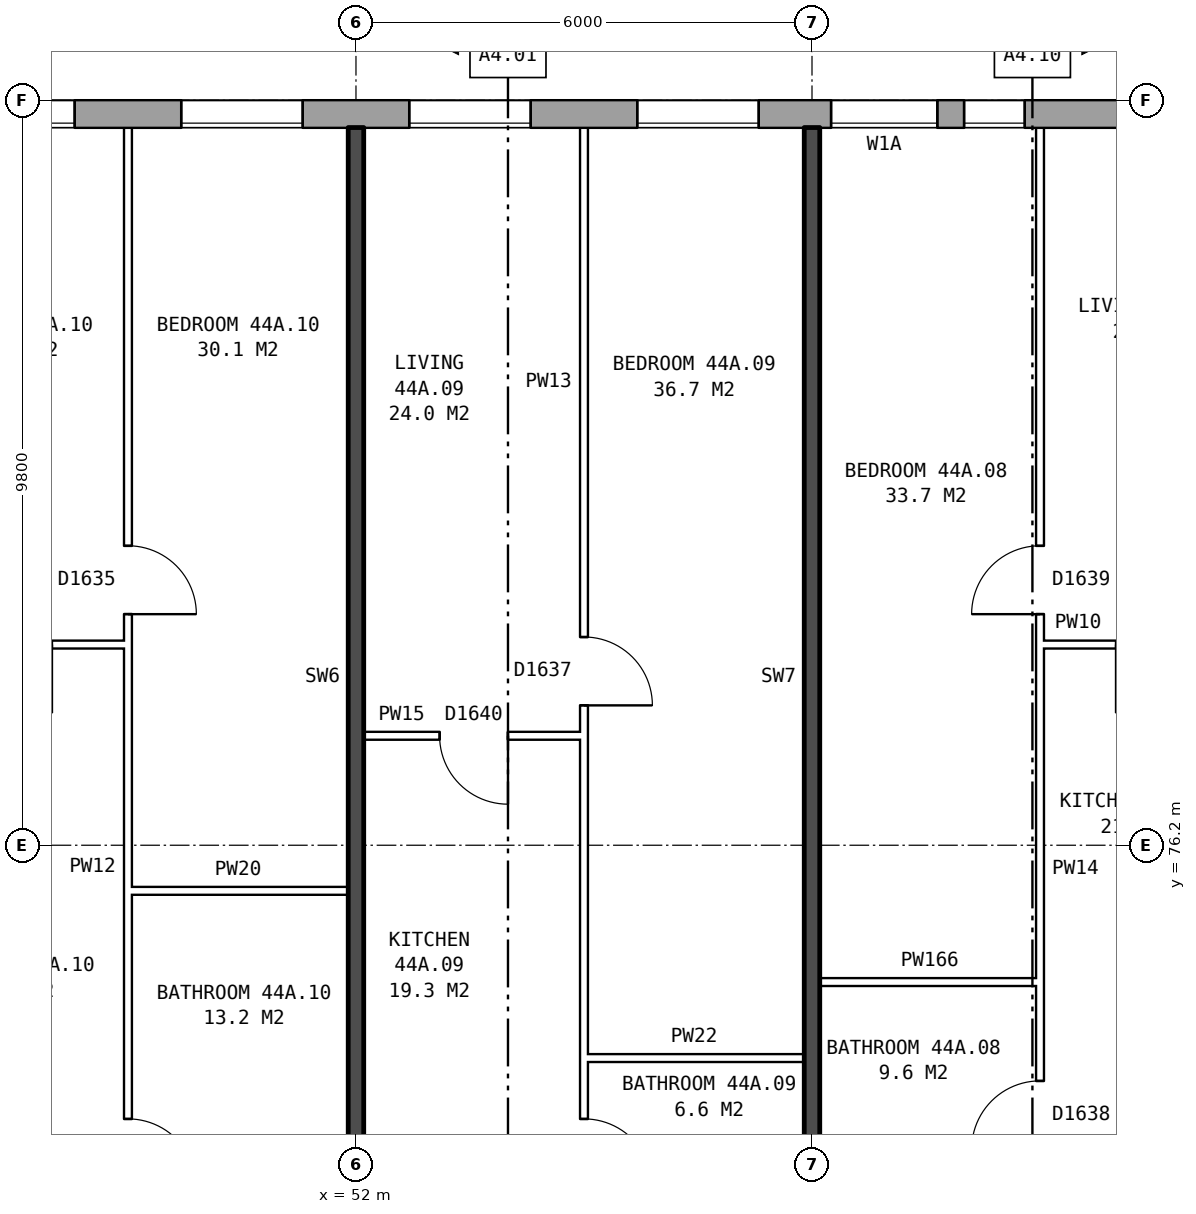
"""IFC4 building model, lengths in metres.
Left out: names, types, materials, properties, quantities, classifications, styles, units other than length and angle.
Written with IfcOpenShell. Run it as: python <this file> out.ifc"""

import sys

from ifc_helpers import new_model, si_unit, direction, frame, frame_2d, origin, place, context, subcontext, project, spatial, rectangle, extrude, element, fill, save


model = new_model("IFC4")
c1 = context("Model", 3, precision=1e-05, world=origin(), true_north=direction((0.0, 1.0)))
c2 = subcontext(c1, "Body", "Model", "MODEL_VIEW")
j1 = project(units=[si_unit("LENGTHUNIT", "METRE"), si_unit("PLANEANGLEUNIT", "RADIAN")], contexts=[c1])
p1 = place(None, origin())
s1 = spatial("IfcSite", under=j1, at=p1, CompositionType="ELEMENT")
p2 = place(p1, origin())
s2 = spatial("IfcBuilding", under=s1, at=p2, CompositionType="ELEMENT")
p3 = place(p2, frame((0.0, 0.0, 157.8)))
s3 = spatial("IfcBuildingStorey", under=s2, at=p3, CompositionType="ELEMENT", Elevation=157.8)
p4 = place(p3, frame((72.925, 85.82, 0.0), z_axis=(0.0, 0.0, 1.0), x_axis=(-1.0, 0.0, 0.0)))
e1 = element("IfcWall", 1, at=p4, inside=s3, PredefinedType="STANDARD", context=c2, shape_type="SweptSolid", body=[
    extrude(rectangle(XDim=41.351, YDim=0.36, at=frame_2d((20.675, 0.0))), origin(), (0.0, 0.0, 1.0), 2.85),
])
p5 = place(p4, frame((0.625, 0.0, 0.8)))
e2 = element("IfcOpeningElement", 2, at=p5, cuts=e1, PredefinedType="OPENING", context=c2, shape_type="SweptSolid", body=[
    extrude(rectangle(XDim=1.6, YDim=1.8, at=frame_2d((0.8, 0.9))), frame((0.0, 0.19, 0.0), z_axis=(0.0, -1.0, 0.0), x_axis=(1.0, 0.0, 0.0)), (0.0, 0.0, 1.0), 0.38),
])
p6 = place(p4, frame((3.625, 0.0, 0.8)))
e3 = element("IfcOpeningElement", 3, at=p6, cuts=e1, PredefinedType="OPENING", context=c2, shape_type="SweptSolid", body=[
    extrude(rectangle(XDim=1.6, YDim=1.8, at=frame_2d((0.8, 0.9))), frame((0.0, 0.19, 0.0), z_axis=(0.0, -1.0, 0.0), x_axis=(1.0, 0.0, 0.0)), (0.0, 0.0, 1.0), 0.38),
])
p7 = place(p4, frame((6.625, 0.0, 0.8)))
e4 = element("IfcOpeningElement", 4, at=p7, cuts=e1, PredefinedType="OPENING", context=c2, shape_type="SweptSolid", body=[
    extrude(rectangle(XDim=1.6, YDim=1.8, at=frame_2d((0.8, 0.9))), frame((0.0, 0.19, 0.0), z_axis=(0.0, -1.0, 0.0), x_axis=(1.0, 0.0, 0.0)), (0.0, 0.0, 1.0), 0.38),
])
p8 = place(p4, frame((9.125, 0.0, 0.8)))
e5 = element("IfcOpeningElement", 5, at=p8, cuts=e1, PredefinedType="OPENING", context=c2, shape_type="SweptSolid", body=[
    extrude(rectangle(XDim=0.6, YDim=1.8, at=frame_2d((0.3, 0.9))), frame((0.0, 0.19, 0.0), z_axis=(0.0, -1.0, 0.0), x_axis=(1.0, 0.0, 0.0)), (0.0, 0.0, 1.0), 0.38),
])
p9 = place(p4, frame((12.125, 0.0, 0.8)))
e6 = element("IfcOpeningElement", 6, at=p9, cuts=e1, PredefinedType="OPENING", context=c2, shape_type="SweptSolid", body=[
    extrude(rectangle(XDim=0.8, YDim=0.9, at=frame_2d((0.4, 0.45))), frame((0.0, 0.19, 0.0), z_axis=(0.0, -1.0, 0.0), x_axis=(1.0, 0.0, 0.0)), (0.0, 0.0, 1.0), 0.38),
])
p10 = place(p4, frame((15.625, 0.0, 0.8)))
e7 = element("IfcOpeningElement", 7, at=p10, cuts=e1, PredefinedType="OPENING", context=c2, shape_type="SweptSolid", body=[
    extrude(rectangle(XDim=1.6, YDim=1.8, at=frame_2d((0.8, 0.9))), frame((0.0, 0.19, 0.0), z_axis=(0.0, -1.0, 0.0), x_axis=(1.0, 0.0, 0.0)), (0.0, 0.0, 1.0), 0.38),
])
p11 = place(p4, frame((18.625, 0.0, 0.8)))
e8 = element("IfcOpeningElement", 8, at=p11, cuts=e1, PredefinedType="OPENING", context=c2, shape_type="SweptSolid", body=[
    extrude(rectangle(XDim=1.6, YDim=1.8, at=frame_2d((0.8, 0.9))), frame((0.0, 0.19, 0.0), z_axis=(0.0, -1.0, 0.0), x_axis=(1.0, 0.0, 0.0)), (0.0, 0.0, 1.0), 0.38),
])
p12 = place(p4, frame((21.625, 0.0, 0.8)))
e9 = element("IfcOpeningElement", 9, at=p12, cuts=e1, PredefinedType="OPENING", context=c2, shape_type="SweptSolid", body=[
    extrude(rectangle(XDim=1.6, YDim=1.8, at=frame_2d((0.8, 0.9))), frame((0.0, 0.19, 0.0), z_axis=(0.0, -1.0, 0.0), x_axis=(1.0, 0.0, 0.0)), (0.0, 0.0, 1.0), 0.38),
])
p13 = place(p4, frame((24.625, 0.0, 0.8)))
e10 = element("IfcOpeningElement", 10, at=p13, cuts=e1, PredefinedType="OPENING", context=c2, shape_type="SweptSolid", body=[
    extrude(rectangle(XDim=1.6, YDim=1.8, at=frame_2d((0.8, 0.9))), frame((0.0, 0.19, 0.0), z_axis=(0.0, -1.0, 0.0), x_axis=(1.0, 0.0, 0.0)), (0.0, 0.0, 1.0), 0.38),
])
p14 = place(p4, frame((27.125, 0.0, 0.8)))
e11 = element("IfcOpeningElement", 11, at=p14, cuts=e1, PredefinedType="OPENING", context=c2, shape_type="SweptSolid", body=[
    extrude(rectangle(XDim=0.8, YDim=1.8, at=frame_2d((0.4, 0.9))), frame((0.0, 0.19, 0.0), z_axis=(0.0, -1.0, 0.0), x_axis=(1.0, 0.0, 0.0)), (0.0, 0.0, 1.0), 0.38),
])
p15 = place(p4, frame((28.225, 0.0, 0.8)))
e12 = element("IfcOpeningElement", 12, at=p15, cuts=e1, PredefinedType="OPENING", context=c2, shape_type="SweptSolid", body=[
    extrude(rectangle(XDim=1.0, YDim=0.9, at=frame_2d((0.5, 0.45))), frame((0.0, 0.19, 0.0), z_axis=(0.0, -1.0, 0.0), x_axis=(1.0, 0.0, 0.0)), (0.0, 0.0, 1.0), 0.38),
])
p16 = place(p4, frame((33.625, 0.0, 0.8)))
e13 = element("IfcOpeningElement", 13, at=p16, cuts=e1, PredefinedType="OPENING", context=c2, shape_type="SweptSolid", body=[
    extrude(rectangle(XDim=1.6, YDim=1.8, at=frame_2d((0.8, 0.9))), frame((0.0, 0.19, 0.0), z_axis=(0.0, -1.0, 0.0), x_axis=(1.0, 0.0, 0.0)), (0.0, 0.0, 1.0), 0.38),
])
p17 = place(p4, frame((36.625, 0.0, 0.8)))
e14 = element("IfcOpeningElement", 14, at=p17, cuts=e1, PredefinedType="OPENING", context=c2, shape_type="SweptSolid", body=[
    extrude(rectangle(XDim=1.6, YDim=1.8, at=frame_2d((0.8, 0.9))), frame((0.0, 0.19, 0.0), z_axis=(0.0, -1.0, 0.0), x_axis=(1.0, 0.0, 0.0)), (0.0, 0.0, 1.0), 0.38),
])
p18 = place(p4, frame((10.025, 0.0, 1.7)))
e15 = element("IfcOpeningElement", 15, at=p18, cuts=e1, PredefinedType="OPENING", context=c2, shape_type="SweptSolid", body=[
    extrude(rectangle(XDim=0.8, YDim=0.9, at=frame_2d((0.4, 0.45))), frame((0.0, 0.19, 0.0), z_axis=(0.0, -1.0, 0.0), x_axis=(1.0, 0.0, 0.0)), (0.0, 0.0, 1.0), 0.38),
])
p19 = place(p4, frame((13.275, 0.0, 0.8)))
e16 = element("IfcOpeningElement", 16, at=p19, cuts=e1, PredefinedType="OPENING", context=c2, shape_type="SweptSolid", body=[
    extrude(rectangle(XDim=1.4, YDim=1.8, at=frame_2d((0.7, 0.9))), frame((0.0, 0.19, 0.0), z_axis=(0.0, -1.0, 0.0), x_axis=(1.0, 0.0, 0.0)), (0.0, 0.0, 1.0), 0.38),
])
p20 = place(p4, frame((30.475, 0.0, 1.7)))
e17 = element("IfcOpeningElement", 17, at=p20, cuts=e1, PredefinedType="OPENING", context=c2, shape_type="SweptSolid", body=[
    extrude(rectangle(XDim=0.8, YDim=0.9, at=frame_2d((0.4, 0.45))), frame((0.0, 0.19, 0.0), z_axis=(0.0, -1.0, 0.0), x_axis=(1.0, 0.0, 0.0)), (0.0, 0.0, 1.0), 0.38),
])
p21 = place(p4, frame((31.625, 0.0, 0.8)))
e18 = element("IfcOpeningElement", 18, at=p21, cuts=e1, PredefinedType="OPENING", context=c2, shape_type="SweptSolid", body=[
    extrude(rectangle(XDim=1.0, YDim=1.8, at=frame_2d((0.5, 0.9))), frame((0.0, 0.19, 0.0), z_axis=(0.0, -1.0, 0.0), x_axis=(1.0, 0.0, 0.0)), (0.0, 0.0, 1.0), 0.38),
])
for number, where, z_axis, x_axis in (
    (19, (55.0, 73.4, 0.0), (0.0, 0.0, 1.0), (1.0, 0.0, 0.0)),
    (20, (58.1, 74.4, 0.0), (0.0, 0.0, 1.0), (1.0, 0.0, 0.0)),
    (21, (49.0, 75.6, 0.0), (0.0, 0.0, 1.0), (1.0, 0.0, 0.0)),
):
    element("IfcWall", number, at=place(p3, frame(where, z_axis=z_axis, x_axis=x_axis)), inside=s3, PredefinedType="PARTITIONING", context=c2, shape_type="SweptSolid", body=[
        extrude(rectangle(XDim=2.9, YDim=0.1, at=frame_2d((1.45, 0.0))), origin(), (0.0, 0.0, 1.0), 2.85),
    ])
p22 = place(p3, frame((52.1, 77.64, 0.0), z_axis=(0.0, 0.0, 1.0), x_axis=(1.0, 0.0, 0.0)))
e22 = element("IfcWall", 22, at=p22, inside=s3, PredefinedType="PARTITIONING", context=c2, shape_type="SweptSolid", body=[
    extrude(rectangle(XDim=2.9, YDim=0.1, at=frame_2d((1.45, 0.0))), origin(), (0.0, 0.0, 1.0), 2.85),
])
p23 = place(p22, frame((1.0, 0.0, 0.0)))
e23 = element("IfcOpeningElement", 23, at=p23, cuts=e22, PredefinedType="OPENING", context=c2, shape_type="SweptSolid", body=[
    extrude(rectangle(XDim=0.9, YDim=2.1, at=frame_2d((0.45, 1.05))), frame((0.0, 0.06, 0.0), z_axis=(0.0, -1.0, 0.0), x_axis=(1.0, 0.0, 0.0)), (0.0, 0.0, 1.0), 0.12),
])
p24 = place(p3, frame((46.1, 78.84, 0.0), z_axis=(0.0, 0.0, 1.0), x_axis=(1.0, 0.0, 0.0)))
e24 = element("IfcWall", 24, at=p24, inside=s3, PredefinedType="PARTITIONING", context=c2, shape_type="SweptSolid", body=[
    extrude(rectangle(XDim=2.9, YDim=0.1, at=frame_2d((1.45, 0.0))), origin(), (0.0, 0.0, 1.0), 2.85),
])
p25 = place(p24, frame((1.0, 0.0, 0.0)))
e25 = element("IfcOpeningElement", 25, at=p25, cuts=e24, PredefinedType="OPENING", context=c2, shape_type="SweptSolid", body=[
    extrude(rectangle(XDim=0.9, YDim=2.1, at=frame_2d((0.45, 1.05))), frame((0.0, 0.06, 0.0), z_axis=(0.0, -1.0, 0.0), x_axis=(1.0, 0.0, 0.0)), (0.0, 0.0, 1.0), 0.12),
])
p26 = place(p3, frame((61.0, 78.84, 0.0), z_axis=(0.0, 0.0, 1.0), x_axis=(1.0, 0.0, 0.0)))
e26 = element("IfcWall", 26, at=p26, inside=s3, PredefinedType="PARTITIONING", context=c2, shape_type="SweptSolid", body=[
    extrude(rectangle(XDim=2.9, YDim=0.1, at=frame_2d((1.45, 0.0))), origin(), (0.0, 0.0, 1.0), 2.85),
])
p27 = place(p26, frame((1.0, 0.0, 0.0)))
e27 = element("IfcOpeningElement", 27, at=p27, cuts=e26, PredefinedType="OPENING", context=c2, shape_type="SweptSolid", body=[
    extrude(rectangle(XDim=0.9, YDim=2.1, at=frame_2d((0.45, 1.05))), frame((0.0, 0.06, 0.0), z_axis=(0.0, -1.0, 0.0), x_axis=(1.0, 0.0, 0.0)), (0.0, 0.0, 1.0), 0.12),
])
p28 = place(p3, frame((49.0, 71.3, 0.0), z_axis=(0.0, 0.0, 1.0), x_axis=(0.0, 1.0, 0.0)))
e28 = element("IfcWall", 28, at=p28, inside=s3, PredefinedType="PARTITIONING", context=c2, shape_type="SweptSolid", body=[
    extrude(rectangle(XDim=14.34, YDim=0.1, at=frame_2d((7.17, 0.0))), origin(), (0.0, 0.0, 1.0), 2.85),
])
p29 = place(p28, frame((7.94, 0.0, 0.0)))
e29 = element("IfcOpeningElement", 29, at=p29, cuts=e28, PredefinedType="OPENING", context=c2, shape_type="SweptSolid", body=[
    extrude(rectangle(XDim=0.9, YDim=2.1, at=frame_2d((0.45, 1.05))), frame((0.0, 0.06, 0.0), z_axis=(0.0, -1.0, 0.0), x_axis=(1.0, 0.0, 0.0)), (0.0, 0.0, 1.0), 0.12),
])
p30 = place(p28, frame((0.4, 0.0, 0.0)))
e30 = element("IfcOpeningElement", 30, at=p30, cuts=e28, PredefinedType="OPENING", context=c2, shape_type="SweptSolid", body=[
    extrude(rectangle(XDim=0.9, YDim=2.1, at=frame_2d((0.45, 1.05))), frame((0.0, 0.06, 0.0), z_axis=(0.0, -1.0, 0.0), x_axis=(1.0, 0.0, 0.0)), (0.0, 0.0, 1.0), 0.12),
])
p31 = place(p3, frame((52.0, 71.2, 0.0), z_axis=(0.0, 0.0, 1.0), x_axis=(0.0, 1.0, 0.0)))
e31 = element("IfcWall", 31, at=p31, inside=s3, PredefinedType="SOLIDWALL", context=c2, shape_type="SweptSolid", body=[
    extrude(rectangle(XDim=14.44, YDim=0.2, at=frame_2d((7.22, 0.0))), origin(), (0.0, 0.0, 1.0), 2.85),
])
p32 = place(p3, frame((55.0, 71.3, 0.0), z_axis=(0.0, 0.0, 1.0), x_axis=(0.0, 1.0, 0.0)))
e32 = element("IfcWall", 32, at=p32, inside=s3, PredefinedType="PARTITIONING", context=c2, shape_type="SweptSolid", body=[
    extrude(rectangle(XDim=14.34, YDim=0.1, at=frame_2d((7.17, 0.0))), origin(), (0.0, 0.0, 1.0), 2.85),
])
p33 = place(p32, frame((6.74, 0.0, 0.0)))
e33 = element("IfcOpeningElement", 33, at=p33, cuts=e32, PredefinedType="OPENING", context=c2, shape_type="SweptSolid", body=[
    extrude(rectangle(XDim=0.9, YDim=2.1, at=frame_2d((0.45, 1.05))), frame((0.0, 0.06, 0.0), z_axis=(0.0, -1.0, 0.0), x_axis=(1.0, 0.0, 0.0)), (0.0, 0.0, 1.0), 0.12),
])
p34 = place(p32, frame((0.4, 0.0, 0.0)))
e34 = element("IfcOpeningElement", 34, at=p34, cuts=e32, PredefinedType="OPENING", context=c2, shape_type="SweptSolid", body=[
    extrude(rectangle(XDim=0.9, YDim=2.1, at=frame_2d((0.45, 1.05))), frame((0.0, 0.06, 0.0), z_axis=(0.0, -1.0, 0.0), x_axis=(1.0, 0.0, 0.0)), (0.0, 0.0, 1.0), 0.12),
])
p35 = place(p3, frame((58.0, 71.2, 0.0), z_axis=(0.0, 0.0, 1.0), x_axis=(0.0, 1.0, 0.0)))
e35 = element("IfcWall", 35, at=p35, inside=s3, PredefinedType="SOLIDWALL", context=c2, shape_type="SweptSolid", body=[
    extrude(rectangle(XDim=14.44, YDim=0.2, at=frame_2d((7.22, 0.0))), origin(), (0.0, 0.0, 1.0), 2.85),
])
p36 = place(p3, frame((61.0, 71.3, 0.0), z_axis=(0.0, 0.0, 1.0), x_axis=(0.0, 1.0, 0.0)))
e36 = element("IfcWall", 36, at=p36, inside=s3, PredefinedType="PARTITIONING", context=c2, shape_type="SweptSolid", body=[
    extrude(rectangle(XDim=14.34, YDim=0.1, at=frame_2d((7.17, 0.0))), origin(), (0.0, 0.0, 1.0), 2.85),
])
p37 = place(p36, frame((7.94, 0.0, 0.0)))
e37 = element("IfcOpeningElement", 37, at=p37, cuts=e36, PredefinedType="OPENING", context=c2, shape_type="SweptSolid", body=[
    extrude(rectangle(XDim=0.9, YDim=2.1, at=frame_2d((0.45, 1.05))), frame((0.0, 0.06, 0.0), z_axis=(0.0, -1.0, 0.0), x_axis=(1.0, 0.0, 0.0)), (0.0, 0.0, 1.0), 0.12),
])
p38 = place(p36, frame((0.9, 0.0, 0.0)))
e38 = element("IfcOpeningElement", 38, at=p38, cuts=e36, PredefinedType="OPENING", context=c2, shape_type="SweptSolid", body=[
    extrude(rectangle(XDim=0.9, YDim=2.1, at=frame_2d((0.45, 1.05))), frame((0.0, 0.06, 0.0), z_axis=(0.0, -1.0, 0.0), x_axis=(1.0, 0.0, 0.0)), (0.0, 0.0, 1.0), 0.12),
])
p39 = place(p9, origin())
e39 = element("IfcWindow", 39, at=p39, inside=s3, PartitioningType="SINGLE_PANEL", PredefinedType="WINDOW", context=c2, shape_type="SweptSolid", body=[
    extrude(rectangle(XDim=0.8, YDim=0.9, at=frame_2d((0.4, 0.45))), frame((0.0, 0.15, 0.0), z_axis=(0.0, -1.0, 0.0), x_axis=(1.0, 0.0, 0.0)), (0.0, 0.0, 1.0), 0.06),
])
fill(e6, e39)
p40 = place(p10, origin())
e40 = element("IfcWindow", 40, at=p40, inside=s3, PartitioningType="SINGLE_PANEL", PredefinedType="WINDOW", context=c2, shape_type="SweptSolid", body=[
    extrude(rectangle(XDim=1.6, YDim=1.8, at=frame_2d((0.8, 0.9))), frame((0.0, 0.15, 0.0), z_axis=(0.0, -1.0, 0.0), x_axis=(1.0, 0.0, 0.0)), (0.0, 0.0, 1.0), 0.06),
])
fill(e7, e40)
p41 = place(p11, origin())
e41 = element("IfcWindow", 41, at=p41, inside=s3, PartitioningType="SINGLE_PANEL", PredefinedType="WINDOW", context=c2, shape_type="SweptSolid", body=[
    extrude(rectangle(XDim=1.6, YDim=1.8, at=frame_2d((0.8, 0.9))), frame((0.0, 0.15, 0.0), z_axis=(0.0, -1.0, 0.0), x_axis=(1.0, 0.0, 0.0)), (0.0, 0.0, 1.0), 0.06),
])
fill(e8, e41)
p42 = place(p12, origin())
e42 = element("IfcWindow", 42, at=p42, inside=s3, PartitioningType="SINGLE_PANEL", PredefinedType="WINDOW", context=c2, shape_type="SweptSolid", body=[
    extrude(rectangle(XDim=1.6, YDim=1.8, at=frame_2d((0.8, 0.9))), frame((0.0, 0.15, 0.0), z_axis=(0.0, -1.0, 0.0), x_axis=(1.0, 0.0, 0.0)), (0.0, 0.0, 1.0), 0.06),
])
fill(e9, e42)
p43 = place(p13, origin())
e43 = element("IfcWindow", 43, at=p43, inside=s3, PartitioningType="SINGLE_PANEL", PredefinedType="WINDOW", context=c2, shape_type="SweptSolid", body=[
    extrude(rectangle(XDim=1.6, YDim=1.8, at=frame_2d((0.8, 0.9))), frame((0.0, 0.15, 0.0), z_axis=(0.0, -1.0, 0.0), x_axis=(1.0, 0.0, 0.0)), (0.0, 0.0, 1.0), 0.06),
])
fill(e10, e43)
p44 = place(p37, origin())
e44 = element("IfcDoor", 44, at=p44, inside=s3, OperationType="SINGLE_SWING_LEFT", PredefinedType="DOOR", context=c2, shape_type="SweptSolid", body=[
    extrude(rectangle(XDim=0.9, YDim=2.1, at=frame_2d((0.45, 1.05))), frame((0.0, 0.025, 0.0), z_axis=(0.0, -1.0, 0.0), x_axis=(1.0, 0.0, 0.0)), (0.0, 0.0, 1.0), 0.05),
])
fill(e37, e44)
p45 = place(p38, origin())
e45 = element("IfcDoor", 45, at=p45, inside=s3, OperationType="SINGLE_SWING_LEFT", PredefinedType="DOOR", context=c2, shape_type="SweptSolid", body=[
    extrude(rectangle(XDim=0.9, YDim=2.1, at=frame_2d((0.45, 1.05))), frame((0.0, 0.025, 0.0), z_axis=(0.0, -1.0, 0.0), x_axis=(1.0, 0.0, 0.0)), (0.0, 0.0, 1.0), 0.05),
])
fill(e38, e45)
p46 = place(p33, frame((0.9, 0.0, 0.0), z_axis=(0.0, 0.0, 1.0), x_axis=(-1.0, 0.0, 0.0)))
e46 = element("IfcDoor", 46, at=p46, inside=s3, OperationType="SINGLE_SWING_RIGHT", PredefinedType="DOOR", context=c2, shape_type="SweptSolid", body=[
    extrude(rectangle(XDim=0.9, YDim=2.1, at=frame_2d((0.45, 1.05))), frame((0.0, 0.025, 0.0), z_axis=(0.0, -1.0, 0.0), x_axis=(1.0, 0.0, 0.0)), (0.0, 0.0, 1.0), 0.05),
])
fill(e33, e46)
p47 = place(p23, frame((0.9, 0.0, 0.0), z_axis=(0.0, 0.0, 1.0), x_axis=(-1.0, 0.0, 0.0)))
e47 = element("IfcDoor", 47, at=p47, inside=s3, OperationType="SINGLE_SWING_LEFT", PredefinedType="DOOR", context=c2, shape_type="SweptSolid", body=[
    extrude(rectangle(XDim=0.9, YDim=2.1, at=frame_2d((0.45, 1.05))), frame((0.0, 0.025, 0.0), z_axis=(0.0, -1.0, 0.0), x_axis=(1.0, 0.0, 0.0)), (0.0, 0.0, 1.0), 0.05),
])
fill(e23, e47)
p48 = place(p34, frame((0.9, 0.0, 0.0), z_axis=(0.0, 0.0, 1.0), x_axis=(-1.0, 0.0, 0.0)))
e48 = element("IfcDoor", 48, at=p48, inside=s3, OperationType="SINGLE_SWING_RIGHT", PredefinedType="DOOR", context=c2, shape_type="SweptSolid", body=[
    extrude(rectangle(XDim=0.9, YDim=2.1, at=frame_2d((0.45, 1.05))), frame((0.0, 0.025, 0.0), z_axis=(0.0, -1.0, 0.0), x_axis=(1.0, 0.0, 0.0)), (0.0, 0.0, 1.0), 0.05),
])
fill(e34, e48)
p49 = place(p29, frame((0.9, 0.0, 0.0), z_axis=(0.0, 0.0, 1.0), x_axis=(-1.0, 0.0, 0.0)))
e49 = element("IfcDoor", 49, at=p49, inside=s3, OperationType="SINGLE_SWING_RIGHT", PredefinedType="DOOR", context=c2, shape_type="SweptSolid", body=[
    extrude(rectangle(XDim=0.9, YDim=2.1, at=frame_2d((0.45, 1.05))), frame((0.0, 0.025, 0.0), z_axis=(0.0, -1.0, 0.0), x_axis=(1.0, 0.0, 0.0)), (0.0, 0.0, 1.0), 0.05),
])
fill(e29, e49)
p50 = place(p30, frame((0.9, 0.0, 0.0), z_axis=(0.0, 0.0, 1.0), x_axis=(-1.0, 0.0, 0.0)))
e50 = element("IfcDoor", 50, at=p50, inside=s3, OperationType="SINGLE_SWING_RIGHT", PredefinedType="DOOR", context=c2, shape_type="SweptSolid", body=[
    extrude(rectangle(XDim=0.9, YDim=2.1, at=frame_2d((0.45, 1.05))), frame((0.0, 0.025, 0.0), z_axis=(0.0, -1.0, 0.0), x_axis=(1.0, 0.0, 0.0)), (0.0, 0.0, 1.0), 0.05),
])
fill(e30, e50)
p51 = place(p19, origin())
e51 = element("IfcWindow", 51, at=p51, inside=s3, PartitioningType="SINGLE_PANEL", PredefinedType="WINDOW", context=c2, shape_type="SweptSolid", body=[
    extrude(rectangle(XDim=1.4, YDim=1.8, at=frame_2d((0.7, 0.9))), frame((0.0, 0.15, 0.0), z_axis=(0.0, -1.0, 0.0), x_axis=(1.0, 0.0, 0.0)), (0.0, 0.0, 1.0), 0.06),
])
fill(e16, e51)
save(model, sys.argv[1])
